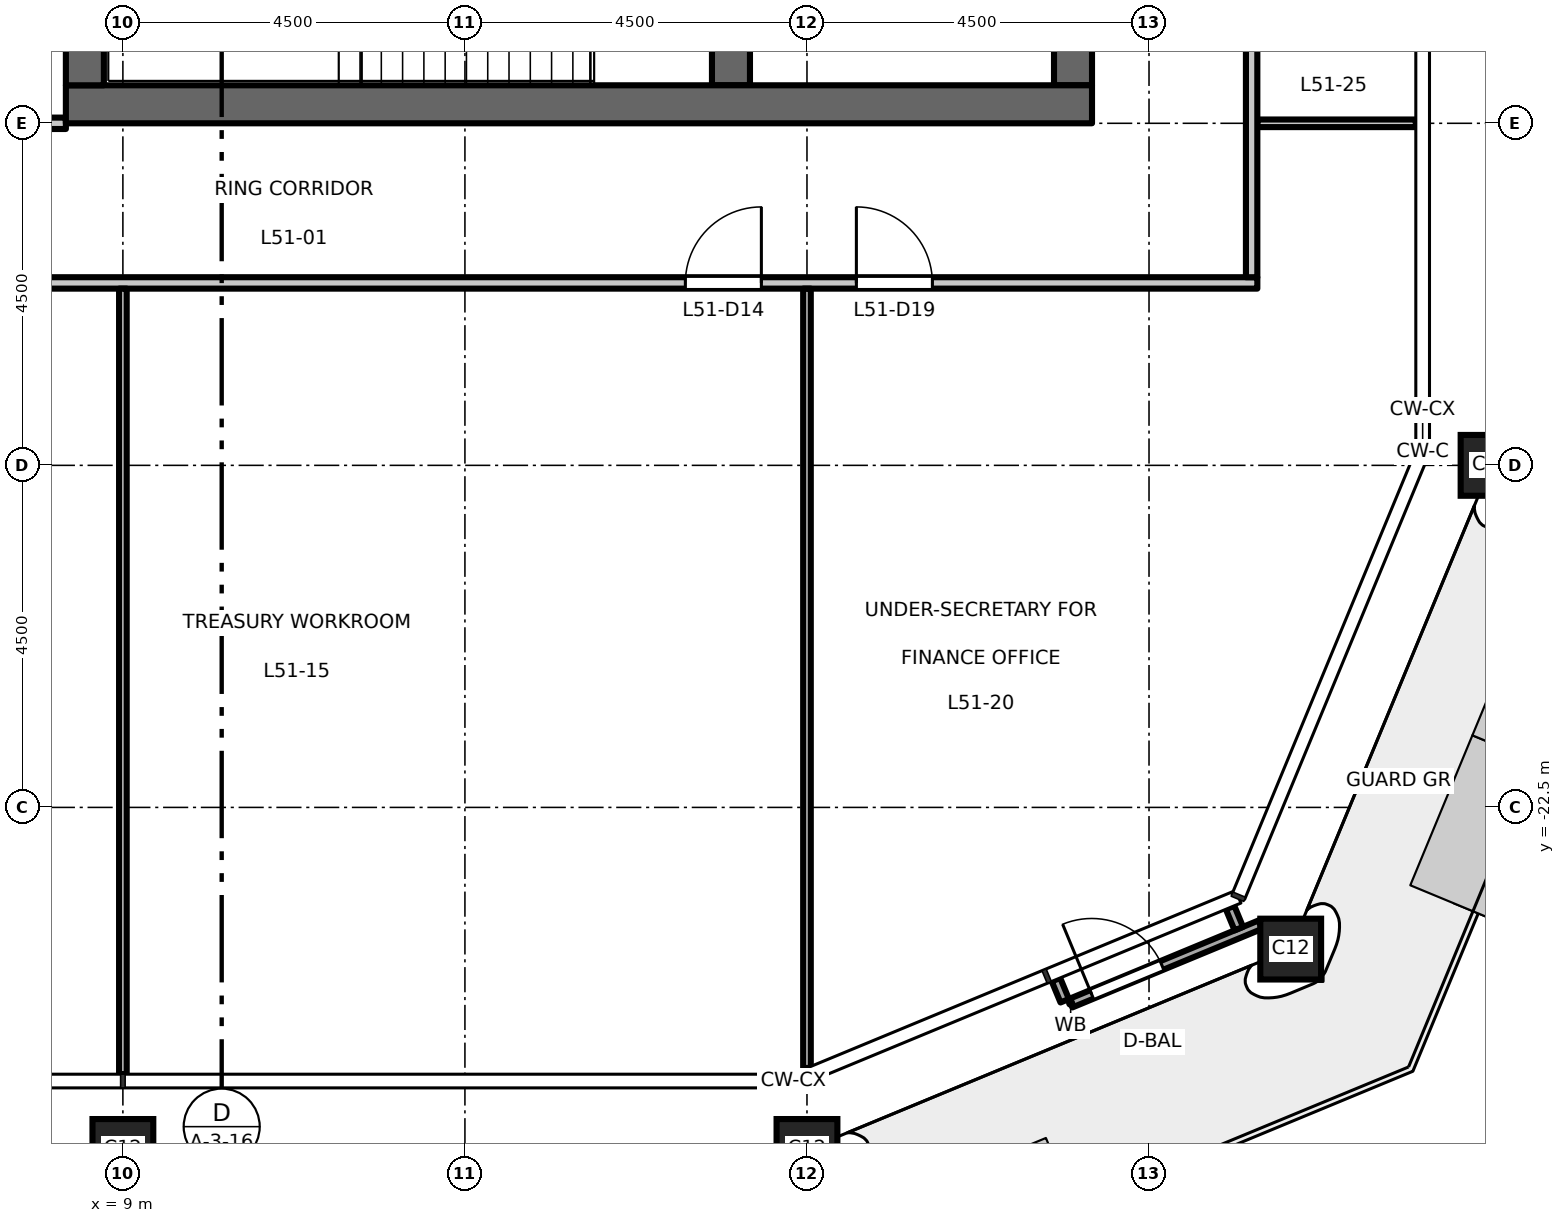
"""IFC4 building model, lengths in metres.
Left out: names, types, materials, properties, quantities, classifications, styles, units other than length and angle.
Written with IfcOpenShell. Run it as: python <this file> out.ifc"""

import sys

from ifc_helpers import new_model, si_unit, direction, frame, frame_2d, origin, origin_2d, place, context, subcontext, project, spatial, rectangle, hollow_rectangle, extrude, element, fill, save


model = new_model("IFC4")
c1 = context("Model", 3, precision=1e-05, world=origin(), true_north=direction((0.0, 1.0)))
c2 = subcontext(c1, "Body", "Model", "MODEL_VIEW")
j1 = project(units=[si_unit("LENGTHUNIT", "METRE"), si_unit("PLANEANGLEUNIT", "RADIAN")], contexts=[c1])
p1 = place(None, origin())
s1 = spatial("IfcSite", under=j1, at=p1, CompositionType="ELEMENT")
p2 = place(p1, origin())
s2 = spatial("IfcBuilding", under=s1, at=p2, CompositionType="ELEMENT")
p3 = place(p2, frame((0.0, 0.0, 237.7)))
s3 = spatial("IfcBuildingStorey", under=s2, at=p3, CompositionType="ELEMENT", Elevation=237.7)
for number, where, z_axis, x_axis in (
    (1, (9.0, -27.0, 0.0), (0.0, 0.0, 1.0), (1.0, 0.0, 0.0)),
    (2, (18.0, -27.0, 0.0), (0.0, 0.0, 1.0), (1.0, 0.0, 0.0)),
    (3, (24.364, -24.364, 0.0), (0.0, 0.0, 1.0), (1.0, 0.0, 0.0)),
    (4, (27.0, -18.0, 0.0), (0.0, 0.0, 1.0), (1.0, 0.0, 0.0)),
):
    element("IfcColumn", number, at=place(p3, frame(where, z_axis=z_axis, x_axis=x_axis)), inside=s3, PredefinedType="COLUMN", context=c2, shape_type="SweptSolid", body=[
        extrude(hollow_rectangle(XDim=0.8, YDim=0.8, WallThickness=0.045, at=origin_2d()), origin(), (0.0, 0.0, 1.0), 4.5),
    ])
p4 = place(p3, frame((21.5, -13.0, 0.0), z_axis=(0.0, 0.0, 1.0), x_axis=(0.0, 1.0, 0.0)))
e5 = element("IfcWall", 5, at=p4, inside=s3, PredefinedType="SHEAR", context=c2, shape_type="SweptSolid", body=[
    extrude(rectangle(XDim=26.0, YDim=0.5, at=frame_2d((13.0, 0.0))), origin(), (0.0, 0.0, 1.0), 4.35),
])
p5 = place(p4, frame((16.825, 0.0, 0.0)))
e6 = element("IfcOpeningElement", 6, at=p5, cuts=e5, PredefinedType="OPENING", context=c2, shape_type="SweptSolid", body=[
    extrude(rectangle(XDim=1.8, YDim=2.1, at=frame_2d((0.9, 1.05))), frame((0.0, 0.26, 0.0), z_axis=(0.0, -1.0, 0.0), x_axis=(1.0, 0.0, 0.0)), (0.0, 0.0, 1.0), 0.52),
])
p6 = place(p4, frame((7.375, 0.0, 0.0)))
e7 = element("IfcOpeningElement", 7, at=p6, cuts=e5, PredefinedType="OPENING", context=c2, shape_type="SweptSolid", body=[
    extrude(rectangle(XDim=1.8, YDim=2.1, at=frame_2d((0.9, 1.05))), frame((0.0, 0.26, 0.0), z_axis=(0.0, -1.0, 0.0), x_axis=(1.0, 0.0, 0.0)), (0.0, 0.0, 1.0), 0.52),
])
p7 = place(p3, frame((17.0, -13.0, 0.0), z_axis=(0.0, 0.0, 1.0), x_axis=(0.0, 1.0, 0.0)))
e8 = element("IfcWall", 8, at=p7, inside=s3, PredefinedType="SHEAR", context=c2, shape_type="SweptSolid", body=[
    extrude(rectangle(XDim=6.575, YDim=0.5, at=frame_2d((3.288, 0.0))), origin(), (0.0, 0.0, 1.0), 4.35),
])
p8 = place(p3, frame((8.25, -13.25, 0.0), z_axis=(0.0, 0.0, 1.0), x_axis=(1.0, 0.0, 0.0)))
e9 = element("IfcWall", 9, at=p8, inside=s3, PredefinedType="SHEAR", context=c2, shape_type="SweptSolid", body=[
    extrude(rectangle(XDim=13.5, YDim=0.5, at=frame_2d((6.75, 0.0))), origin(), (0.0, 0.0, 1.0), 4.35),
])
p9 = place(p3, frame((8.5, -13.0, 0.0), z_axis=(0.0, 0.0, 1.0), x_axis=(0.0, 1.0, 0.0)))
e10 = element("IfcWall", 10, at=p9, inside=s3, PredefinedType="SHEAR", context=c2, shape_type="SweptSolid", body=[
    extrude(rectangle(XDim=26.0, YDim=0.5, at=frame_2d((13.0, 0.0))), origin(), (0.0, 0.0, 1.0), 4.35),
])
p10 = place(p3, frame((21.276, -24.766, 0.0), z_axis=(0.0, 0.0, 1.0), x_axis=(0.382591441855, -0.923917630863, 0.0)))
e11 = element("IfcWall", 11, at=p10, inside=s3, PredefinedType="STANDARD", context=c2, shape_type="SweptSolid", body=[
    extrude(rectangle(XDim=0.3, YDim=0.12, at=frame_2d((0.15, 0.0))), origin(), (0.0, 0.0, 1.0), 4.35),
])
p11 = place(p3, frame((23.566, -23.818, 0.0), z_axis=(0.0, 0.0, 1.0), x_axis=(0.383285987724, -0.923629715641, 0.0)))
e12 = element("IfcWall", 12, at=p11, inside=s3, PredefinedType="STANDARD", context=c2, shape_type="SweptSolid", body=[
    extrude(rectangle(XDim=0.3, YDim=0.12, at=frame_2d((0.15, 0.0))), origin(), (0.0, 0.0, 1.0), 4.35),
])
p12 = place(p3, frame((21.469, -25.076, 0.0), z_axis=(0.0, 0.0, 1.0), x_axis=(0.923874686516, 0.382695131424, 0.0)))
e13 = element("IfcWall", 13, at=p12, inside=s3, PredefinedType="STANDARD", context=c2, shape_type="SweptSolid", body=[
    extrude(rectangle(XDim=2.7, YDim=0.12, at=frame_2d((1.35, 0.0))), origin(), (0.0, 0.0, 1.0), 4.35),
])
p13 = place(p12, frame((0.3, 0.0, 0.0)))
e14 = element("IfcOpeningElement", 14, at=p13, cuts=e13, PredefinedType="OPENING", context=c2, shape_type="SweptSolid", body=[
    extrude(rectangle(XDim=1.0, YDim=2.4, at=frame_2d((0.5, 1.2))), frame((0.0, 0.07, 0.0), z_axis=(0.0, -1.0, 0.0), x_axis=(1.0, 0.0, 0.0)), (0.0, 0.0, 1.0), 0.14),
])
p14 = place(p3, frame((-23.925, -15.6, 0.0), z_axis=(0.0, 0.0, 1.0), x_axis=(1.0, 0.0, 0.0)))
e15 = element("IfcWall", 15, at=p14, inside=s3, PredefinedType="PARTITIONING", context=c2, shape_type="SweptSolid", body=[
    extrude(rectangle(XDim=47.85, YDim=0.15, at=frame_2d((23.925, 0.0))), origin(), (0.0, 0.0, 1.0), 4.35),
])
p15 = place(p14, frame((6.575, 0.0, 0.0)))
e16 = element("IfcOpeningElement", 16, at=p15, cuts=e15, PredefinedType="OPENING", context=c2, shape_type="SweptSolid", body=[
    extrude(rectangle(XDim=1.0, YDim=2.1, at=frame_2d((0.5, 1.05))), frame((0.0, 0.085, 0.0), z_axis=(0.0, -1.0, 0.0), x_axis=(1.0, 0.0, 0.0)), (0.0, 0.0, 1.0), 0.17),
])
p16 = place(p14, frame((15.575, 0.0, 0.0)))
e17 = element("IfcOpeningElement", 17, at=p16, cuts=e15, PredefinedType="OPENING", context=c2, shape_type="SweptSolid", body=[
    extrude(rectangle(XDim=1.0, YDim=2.1, at=frame_2d((0.5, 1.05))), frame((0.0, 0.085, 0.0), z_axis=(0.0, -1.0, 0.0), x_axis=(1.0, 0.0, 0.0)), (0.0, 0.0, 1.0), 0.17),
])
p17 = place(p14, frame((24.575, 0.0, 0.0)))
e18 = element("IfcOpeningElement", 18, at=p17, cuts=e15, PredefinedType="OPENING", context=c2, shape_type="SweptSolid", body=[
    extrude(rectangle(XDim=1.0, YDim=2.1, at=frame_2d((0.5, 1.05))), frame((0.0, 0.085, 0.0), z_axis=(0.0, -1.0, 0.0), x_axis=(1.0, 0.0, 0.0)), (0.0, 0.0, 1.0), 0.17),
])
p18 = place(p14, frame((40.325, 0.0, 0.0)))
e19 = element("IfcOpeningElement", 19, at=p18, cuts=e15, PredefinedType="OPENING", context=c2, shape_type="SweptSolid", body=[
    extrude(rectangle(XDim=1.0, YDim=2.1, at=frame_2d((0.5, 1.05))), frame((0.0, 0.085, 0.0), z_axis=(0.0, -1.0, 0.0), x_axis=(1.0, 0.0, 0.0)), (0.0, 0.0, 1.0), 0.17),
])
p19 = place(p14, frame((0.725, 0.0, 0.0)))
e20 = element("IfcOpeningElement", 20, at=p19, cuts=e15, PredefinedType="OPENING", context=c2, shape_type="SweptSolid", body=[
    extrude(rectangle(XDim=1.0, YDim=2.1, at=frame_2d((0.5, 1.05))), frame((0.0, 0.085, 0.0), z_axis=(0.0, -1.0, 0.0), x_axis=(1.0, 0.0, 0.0)), (0.0, 0.0, 1.0), 0.17),
])
p20 = place(p14, frame((42.575, 0.0, 0.0)))
e21 = element("IfcOpeningElement", 21, at=p20, cuts=e15, PredefinedType="OPENING", context=c2, shape_type="SweptSolid", body=[
    extrude(rectangle(XDim=1.0, YDim=2.1, at=frame_2d((0.5, 1.05))), frame((0.0, 0.085, 0.0), z_axis=(0.0, -1.0, 0.0), x_axis=(1.0, 0.0, 0.0)), (0.0, 0.0, 1.0), 0.17),
])
p21 = place(p3, frame((23.925, -13.5, 0.0), z_axis=(0.0, 0.0, 1.0), x_axis=(1.0, 0.0, 0.0)))
e22 = element("IfcWall", 22, at=p21, inside=s3, PredefinedType="PARTITIONING", context=c2, shape_type="SweptSolid", body=[
    extrude(rectangle(XDim=2.085, YDim=0.1, at=frame_2d((1.042, 0.0))), origin(), (0.0, 0.0, 1.0), 3.95),
])
p22 = place(p3, frame((-8.25, -13.5, 0.0), z_axis=(0.0, 0.0, 1.0), x_axis=(1.0, 0.0, 0.0)))
e23 = element("IfcWall", 23, at=p22, inside=s3, PredefinedType="PARTITIONING", context=c2, shape_type="SweptSolid", body=[
    extrude(rectangle(XDim=16.5, YDim=0.15, at=frame_2d((8.25, 0.0))), origin(), (0.0, 0.0, 1.0), 3.95),
])
p23 = place(p22, frame((0.6, 0.0, 0.0)))
e24 = element("IfcOpeningElement", 24, at=p23, cuts=e23, PredefinedType="OPENING", context=c2, shape_type="SweptSolid", body=[
    extrude(rectangle(XDim=1.0, YDim=2.1, at=frame_2d((0.5, 1.05))), frame((0.0, 0.085, 0.0), z_axis=(0.0, -1.0, 0.0), x_axis=(1.0, 0.0, 0.0)), (0.0, 0.0, 1.0), 0.17),
])
p24 = place(p3, frame((9.0, -26.01, 0.0), z_axis=(0.0, 0.0, 1.0), x_axis=(0.0, 1.0, 0.0)))
e25 = element("IfcWall", 25, at=p24, inside=s3, PredefinedType="PARTITIONING", context=c2, shape_type="SweptSolid", body=[
    extrude(rectangle(XDim=10.335, YDim=0.1, at=frame_2d((5.167, 0.0))), origin(), (0.0, 0.0, 1.0), 3.65),
])
p25 = place(p3, frame((18.0, -25.928, 0.0), z_axis=(0.0, 0.0, 1.0), x_axis=(0.0, 1.0, 0.0)))
e26 = element("IfcWall", 26, at=p25, inside=s3, PredefinedType="PARTITIONING", context=c2, shape_type="SweptSolid", body=[
    extrude(rectangle(XDim=10.253, YDim=0.1, at=frame_2d((5.126, 0.0))), origin(), (0.0, 0.0, 1.0), 3.65),
])
p26 = place(p3, frame((23.85, -15.525, 0.0), z_axis=(0.0, 0.0, 1.0), x_axis=(0.0, 1.0, 0.0)))
e27 = element("IfcWall", 27, at=p26, inside=s3, PredefinedType="PARTITIONING", context=c2, shape_type="SweptSolid", body=[
    extrude(rectangle(XDim=31.05, YDim=0.15, at=frame_2d((15.525, 0.0))), origin(), (0.0, 0.0, 1.0), 4.35),
])
p27 = place(p26, frame((4.925, 0.0, 0.0)))
e28 = element("IfcOpeningElement", 28, at=p27, cuts=e27, PredefinedType="OPENING", context=c2, shape_type="SweptSolid", body=[
    extrude(rectangle(XDim=1.0, YDim=2.1, at=frame_2d((0.5, 1.05))), frame((0.0, 0.085, 0.0), z_axis=(0.0, -1.0, 0.0), x_axis=(1.0, 0.0, 0.0)), (0.0, 0.0, 1.0), 0.17),
])
p28 = place(p26, frame((7.175, 0.0, 0.0)))
e29 = element("IfcOpeningElement", 29, at=p28, cuts=e27, PredefinedType="OPENING", context=c2, shape_type="SweptSolid", body=[
    extrude(rectangle(XDim=1.0, YDim=2.1, at=frame_2d((0.5, 1.05))), frame((0.0, 0.085, 0.0), z_axis=(0.0, -1.0, 0.0), x_axis=(1.0, 0.0, 0.0)), (0.0, 0.0, 1.0), 0.17),
])
p29 = place(p26, frame((22.925, 0.0, 0.0)))
e30 = element("IfcOpeningElement", 30, at=p29, cuts=e27, PredefinedType="OPENING", context=c2, shape_type="SweptSolid", body=[
    extrude(rectangle(XDim=1.0, YDim=2.1, at=frame_2d((0.5, 1.05))), frame((0.0, 0.085, 0.0), z_axis=(0.0, -1.0, 0.0), x_axis=(1.0, 0.0, 0.0)), (0.0, 0.0, 1.0), 0.17),
])
p30 = place(p26, frame((25.175, 0.0, 0.0)))
e31 = element("IfcOpeningElement", 31, at=p30, cuts=e27, PredefinedType="OPENING", context=c2, shape_type="SweptSolid", body=[
    extrude(rectangle(XDim=1.0, YDim=2.1, at=frame_2d((0.5, 1.05))), frame((0.0, 0.085, 0.0), z_axis=(0.0, -1.0, 0.0), x_axis=(1.0, 0.0, 0.0)), (0.0, 0.0, 1.0), 0.17),
])
p31 = place(p13, origin())
e32 = element("IfcDoor", 32, at=p31, inside=s3, OperationType="SINGLE_SWING_LEFT", PredefinedType="DOOR", context=c2, shape_type="SweptSolid", body=[
    extrude(rectangle(XDim=1.0, YDim=2.4, at=frame_2d((0.5, 1.2))), frame((0.0, 0.025, 0.0), z_axis=(0.0, -1.0, 0.0), x_axis=(1.0, 0.0, 0.0)), (0.0, 0.0, 1.0), 0.05),
])
fill(e14, e32)
p32 = place(p18, origin())
e33 = element("IfcDoor", 33, at=p32, inside=s3, OperationType="SINGLE_SWING_RIGHT", PredefinedType="DOOR", context=c2, shape_type="SweptSolid", body=[
    extrude(rectangle(XDim=1.0, YDim=2.1, at=frame_2d((0.5, 1.05))), frame((0.0, 0.025, 0.0), z_axis=(0.0, -1.0, 0.0), x_axis=(1.0, 0.0, 0.0)), (0.0, 0.0, 1.0), 0.05),
])
fill(e19, e33)
p33 = place(p20, origin())
e34 = element("IfcDoor", 34, at=p33, inside=s3, OperationType="SINGLE_SWING_LEFT", PredefinedType="DOOR", context=c2, shape_type="SweptSolid", body=[
    extrude(rectangle(XDim=1.0, YDim=2.1, at=frame_2d((0.5, 1.05))), frame((0.0, 0.025, 0.0), z_axis=(0.0, -1.0, 0.0), x_axis=(1.0, 0.0, 0.0)), (0.0, 0.0, 1.0), 0.05),
])
fill(e21, e34)
save(model, sys.argv[1])
